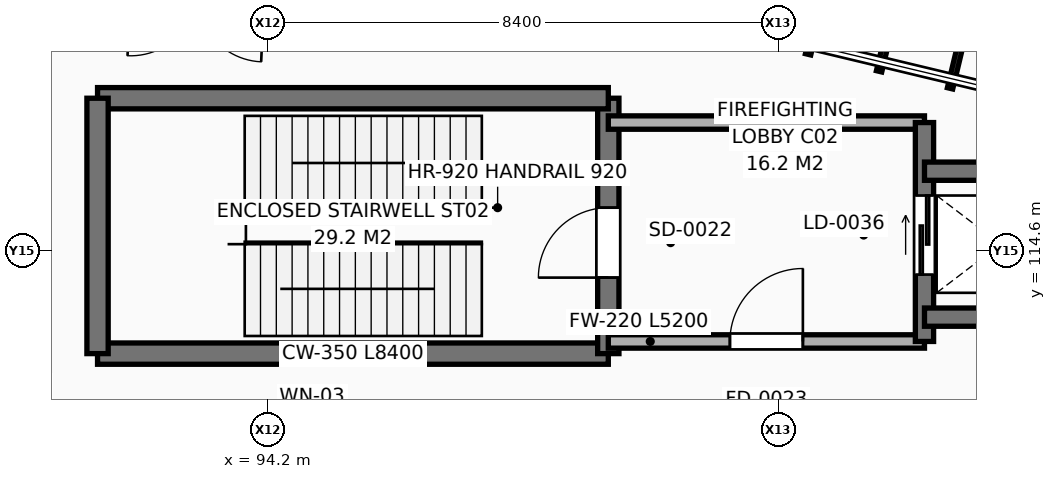
"""IFC4 building model, lengths in metres.
Left out: names, types, materials, properties, quantities, classifications, styles, units other than length and angle.
Written with IfcOpenShell. Run it as: python <this file> out.ifc"""

import sys

from ifc_helpers import new_model, si_unit, direction, frame, frame_2d, origin, place, context, subcontext, project, spatial, rectangle, extrude, element, fill, save


model = new_model("IFC4")
c1 = context("Model", 3, precision=1e-05, world=origin(), true_north=direction((0.0, 1.0)))
c2 = subcontext(c1, "Body", "Model", "MODEL_VIEW")
j1 = project(units=[si_unit("LENGTHUNIT", "METRE"), si_unit("PLANEANGLEUNIT", "RADIAN")], contexts=[c1])
p1 = place(None, origin())
s1 = spatial("IfcSite", under=j1, at=p1, CompositionType="ELEMENT")
p2 = place(p1, origin())
s2 = spatial("IfcBuilding", under=s1, at=p2, CompositionType="ELEMENT")
p3 = place(p2, origin())
s3 = spatial("IfcBuildingStorey", under=s2, at=p3, CompositionType="ELEMENT", Elevation=0.0)
p4 = place(p3, frame((99.01, 111.496, 0.0), z_axis=(0.0, 0.0, 1.0), x_axis=(-0.999197911134, 0.040044155435, 0.0)))
e1 = element("IfcWall", 1, at=p4, inside=s3, PredefinedType="SOLIDWALL", context=c2, shape_type="SweptSolid", body=[
    extrude(rectangle(XDim=13.065, YDim=0.34, at=frame_2d((6.533, 0.0))), origin(), (0.0, 0.0, 1.0), 4.587),
])
p5 = place(p4, frame((3.355, 0.0, 0.9)))
e2 = element("IfcOpeningElement", 2, at=p5, cuts=e1, PredefinedType="OPENING", context=c2, shape_type="SweptSolid", body=[
    extrude(rectangle(XDim=1.5, YDim=2.1, at=frame_2d((0.75, 1.05))), frame((0.0, 0.18, 0.0), z_axis=(0.0, -1.0, 0.0), x_axis=(1.0, 0.0, 0.0)), (0.0, 0.0, 1.0), 0.36),
])
p6 = place(p4, frame((8.21, 0.0, 0.9)))
e3 = element("IfcOpeningElement", 3, at=p6, cuts=e1, PredefinedType="OPENING", context=c2, shape_type="SweptSolid", body=[
    extrude(rectangle(XDim=1.5, YDim=2.1, at=frame_2d((0.75, 1.05))), frame((0.0, 0.18, 0.0), z_axis=(0.0, -1.0, 0.0), x_axis=(1.0, 0.0, 0.0)), (0.0, 0.0, 1.0), 0.36),
])
p7 = place(p3, frame((91.4, 112.9, 0.0), z_axis=(0.0, 0.0, 1.0), x_axis=(1.0, 0.0, 0.0)))
e4 = element("IfcWall", 4, at=p7, inside=s3, PredefinedType="SHEAR", context=c2, shape_type="SweptSolid", body=[
    extrude(rectangle(XDim=8.4, YDim=0.35, at=frame_2d((4.2, 0.0))), origin(), (0.0, 0.0, 1.0), 5.12),
])
p8 = place(p3, frame((99.8, 112.9, 0.0), z_axis=(0.0, 0.0, 1.0), x_axis=(0.0, 1.0, 0.0)))
e5 = element("IfcWall", 5, at=p8, inside=s3, PredefinedType="SHEAR", context=c2, shape_type="SweptSolid", body=[
    extrude(rectangle(XDim=4.2, YDim=0.35, at=frame_2d((2.1, 0.0))), origin(), (0.0, 0.0, 1.0), 5.12),
])
p9 = place(p8, frame((1.25, 0.0, 0.0)))
e6 = element("IfcOpeningElement", 6, at=p9, cuts=e5, PredefinedType="OPENING", context=c2, shape_type="SweptSolid", body=[
    extrude(rectangle(XDim=1.15, YDim=2.2, at=frame_2d((0.575, 1.1))), frame((0.0, 0.185, 0.0), z_axis=(0.0, -1.0, 0.0), x_axis=(1.0, 0.0, 0.0)), (0.0, 0.0, 1.0), 0.37),
])
p10 = place(p3, frame((99.8, 117.1, 0.0), z_axis=(0.0, 0.0, 1.0), x_axis=(-1.0, 0.0, 0.0)))
e7 = element("IfcWall", 7, at=p10, inside=s3, PredefinedType="SHEAR", context=c2, shape_type="SweptSolid", body=[
    extrude(rectangle(XDim=8.4, YDim=0.35, at=frame_2d((4.2, 0.0))), origin(), (0.0, 0.0, 1.0), 5.12),
])
p11 = place(p3, frame((91.4, 117.1, 0.0), z_axis=(0.0, 0.0, 1.0), x_axis=(0.0, -1.0, 0.0)))
e8 = element("IfcWall", 8, at=p11, inside=s3, PredefinedType="SHEAR", context=c2, shape_type="SweptSolid", body=[
    extrude(rectangle(XDim=4.2, YDim=0.35, at=frame_2d((2.1, 0.0))), origin(), (0.0, 0.0, 1.0), 5.12),
])
p12 = place(p3, frame((99.8, 113.1, 0.0), z_axis=(0.0, 0.0, 1.0), x_axis=(1.0, 0.0, 0.0)))
e9 = element("IfcWall", 9, at=p12, inside=s3, PredefinedType="SOLIDWALL", context=c2, shape_type="SweptSolid", body=[
    extrude(rectangle(XDim=5.2, YDim=0.22, at=frame_2d((2.6, 0.0))), origin(), (0.0, 0.0, 1.0), 5.12),
])
p13 = place(p12, frame((2.0, 0.0, 0.0)))
e10 = element("IfcOpeningElement", 10, at=p13, cuts=e9, PredefinedType="OPENING", context=c2, shape_type="SweptSolid", body=[
    extrude(rectangle(XDim=1.2, YDim=2.2, at=frame_2d((0.6, 1.1))), frame((0.0, 0.12, 0.0), z_axis=(0.0, -1.0, 0.0), x_axis=(1.0, 0.0, 0.0)), (0.0, 0.0, 1.0), 0.24),
])
p14 = place(p3, frame((105.0, 116.7, 0.0), z_axis=(0.0, 0.0, 1.0), x_axis=(-1.0, 0.0, 0.0)))
e11 = element("IfcWall", 11, at=p14, inside=s3, PredefinedType="SOLIDWALL", context=c2, shape_type="SweptSolid", body=[
    extrude(rectangle(XDim=5.2, YDim=0.22, at=frame_2d((2.6, 0.0))), origin(), (0.0, 0.0, 1.0), 5.12),
])
p15 = place(p3, frame((105.0, 113.1, 0.0), z_axis=(0.0, 0.0, 1.0), x_axis=(0.0, 1.0, 0.0)))
e12 = element("IfcWall", 12, at=p15, inside=s3, PredefinedType="SHEAR", context=c2, shape_type="SweptSolid", body=[
    extrude(rectangle(XDim=3.6, YDim=0.3, at=frame_2d((1.8, 0.0))), origin(), (0.0, 0.0, 1.0), 5.12),
])
p16 = place(p15, frame((1.1, 0.0, 0.0)))
e13 = element("IfcOpeningElement", 13, at=p16, cuts=e12, PredefinedType="OPENING", context=c2, shape_type="SweptSolid", body=[
    extrude(rectangle(XDim=1.3, YDim=2.3, at=frame_2d((0.65, 1.15))), frame((0.0, 0.16, 0.0), z_axis=(0.0, -1.0, 0.0), x_axis=(1.0, 0.0, 0.0)), (0.0, 0.0, 1.0), 0.32),
])
for number, where, z_axis, x_axis in (
    (14, (107.5, 115.9, 0.0), (0.0, 0.0, 1.0), (-1.0, 0.0, 0.0)),
    (15, (105.0, 113.5, 0.0), (0.0, 0.0, 1.0), (1.0, 0.0, 0.0)),
):
    element("IfcWall", number, at=place(p3, frame(where, z_axis=z_axis, x_axis=x_axis)), inside=s3, PredefinedType="SHEAR", context=c2, shape_type="SweptSolid", body=[
        extrude(rectangle(XDim=2.5, YDim=0.3, at=frame_2d((1.25, 0.0))), origin(), (0.0, 0.0, 1.0), 5.12),
    ])
p17 = place(p9, frame((1.15, 0.0, 0.0), z_axis=(0.0, 0.0, 1.0), x_axis=(-1.0, 0.0, 0.0)))
e16 = element("IfcDoor", 16, at=p17, inside=s3, OperationType="SINGLE_SWING_LEFT", PredefinedType="DOOR", context=c2, shape_type="SweptSolid", body=[
    extrude(rectangle(XDim=1.15, YDim=2.2, at=frame_2d((0.575, 1.1))), frame((0.0, 0.025, 0.0), z_axis=(0.0, -1.0, 0.0), x_axis=(1.0, 0.0, 0.0)), (0.0, 0.0, 1.0), 0.05),
])
fill(e6, e16)
p18 = place(p13, origin())
e17 = element("IfcDoor", 17, at=p18, inside=s3, OperationType="SINGLE_SWING_RIGHT", PredefinedType="DOOR", context=c2, shape_type="SweptSolid", body=[
    extrude(rectangle(XDim=1.2, YDim=2.2, at=frame_2d((0.6, 1.1))), frame((0.0, 0.025, 0.0), z_axis=(0.0, -1.0, 0.0), x_axis=(1.0, 0.0, 0.0)), (0.0, 0.0, 1.0), 0.05),
])
fill(e10, e17)
p19 = place(p16, origin())
e18 = element("IfcDoor", 18, at=p19, inside=s3, OperationType="SLIDING_TO_LEFT", PredefinedType="DOOR", context=c2, shape_type="SweptSolid", body=[
    extrude(rectangle(XDim=1.3, YDim=2.3, at=frame_2d((0.65, 1.15))), frame((0.0, 0.025, 0.0), z_axis=(0.0, -1.0, 0.0), x_axis=(1.0, 0.0, 0.0)), (0.0, 0.0, 1.0), 0.05),
])
fill(e13, e18)
save(model, sys.argv[1])
